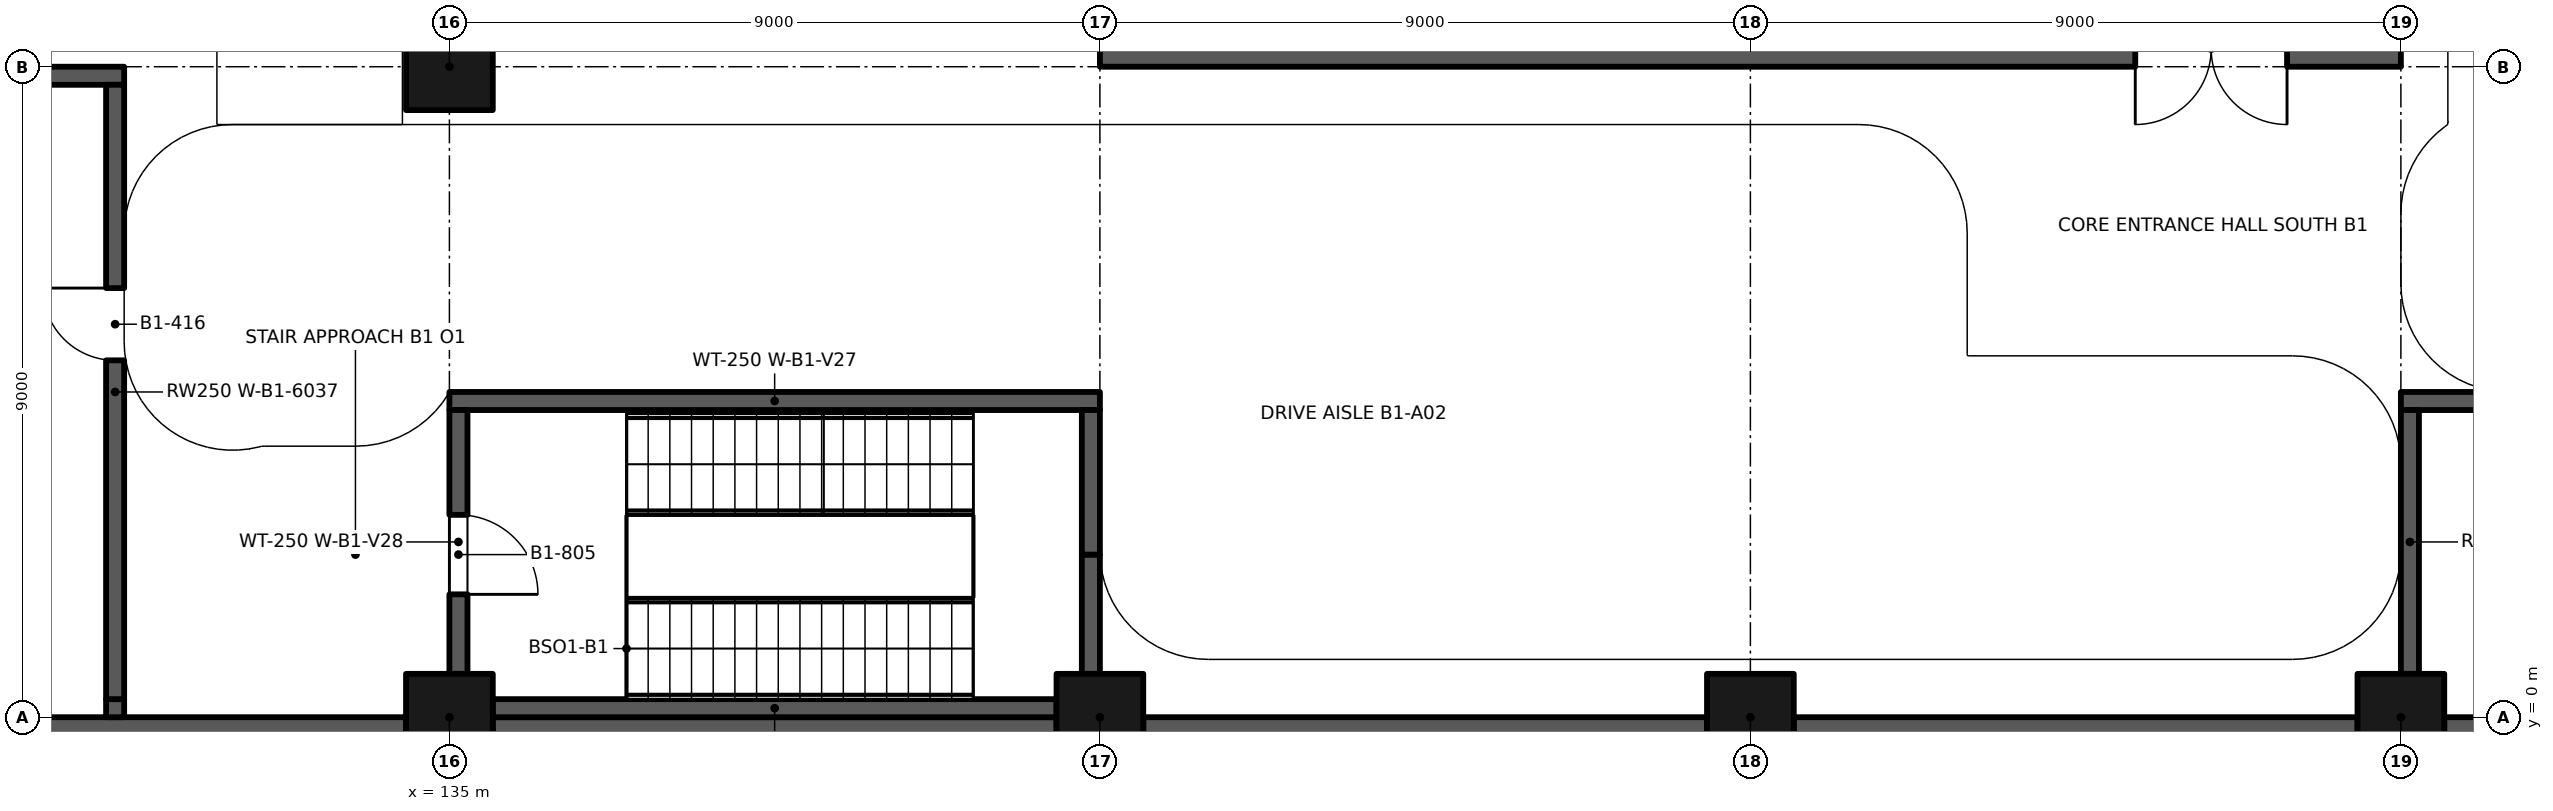
"""IFC4 building model, lengths in metres.
Left out: names, types, materials, properties, quantities, classifications, styles, units other than length and angle.
Written with IfcOpenShell. Run it as: python <this file> out.ifc"""

import sys

from ifc_helpers import new_model, si_unit, direction, frame, frame_2d, origin, origin_2d, place, context, subcontext, project, spatial, rectangle, extrude, element, fill, save


model = new_model("IFC4")
c1 = context("Model", 3, precision=1e-05, world=origin(), true_north=direction((0.0, 1.0)))
c2 = subcontext(c1, "Body", "Model", "MODEL_VIEW")
j1 = project(units=[si_unit("LENGTHUNIT", "METRE"), si_unit("PLANEANGLEUNIT", "RADIAN")], contexts=[c1])
p1 = place(None, origin())
s1 = spatial("IfcSite", under=j1, at=p1, CompositionType="ELEMENT")
p2 = place(p1, origin())
s2 = spatial("IfcBuilding", under=s1, at=p2, CompositionType="ELEMENT")
p3 = place(p2, frame((0.0, 0.0, -5.1)))
s3 = spatial("IfcBuildingStorey", under=s2, at=p3, CompositionType="ELEMENT", Elevation=-5.1)
for number, where, z_axis, x_axis in (
    (1, (126.6, -0.2, 0.0), (0.0, 0.0, 1.0), (1.0, 0.0, 0.0)),
    (2, (135.6, -0.2, 0.0), (0.0, 0.0, 1.0), (1.0, 0.0, 0.0)),
    (3, (144.6, -0.2, 0.0), (0.0, 0.0, 1.0), (1.0, 0.0, 0.0)),
    (4, (153.6, -0.2, 0.0), (0.0, 0.0, 1.0), (1.0, 0.0, 0.0)),
    (5, (162.6, -0.2, 0.0), (0.0, 0.0, 1.0), (1.0, 0.0, 0.0)),
):
    element("IfcWall", number, at=place(p3, frame(where, z_axis=z_axis, x_axis=x_axis)), inside=s3, PredefinedType="SOLIDWALL", context=c2, shape_type="SweptSolid", body=[
        extrude(rectangle(XDim=7.8, YDim=0.4, at=frame_2d((3.9, 0.0))), origin(), (0.0, 0.0, 1.0), 5.1),
    ])
for number, where, z_axis, x_axis in (
    (6, (135.0, 0.0, 0.0), (0.0, 0.0, 1.0), (1.0, 0.0, 0.0)),
    (7, (144.0, 0.0, 0.0), (0.0, 0.0, 1.0), (1.0, 0.0, 0.0)),
    (8, (153.0, 0.0, 0.0), (0.0, 0.0, 1.0), (1.0, 0.0, 0.0)),
    (9, (162.0, 0.0, 0.0), (0.0, 0.0, 1.0), (1.0, 0.0, 0.0)),
    (10, (135.0, 9.0, 0.0), (0.0, 0.0, 1.0), (1.0, 0.0, 0.0)),
):
    element("IfcColumn", number, at=place(p3, frame(where, z_axis=z_axis, x_axis=x_axis)), inside=s3, PredefinedType="COLUMN", context=c2, shape_type="SweptSolid", body=[
        extrude(rectangle(XDim=1.2, YDim=1.2, at=origin_2d()), origin(), (0.0, 0.0, 1.0), 5.1),
    ])
p4 = place(p3, frame((135.6, 0.125, 0.0), z_axis=(0.0, 0.0, 1.0), x_axis=(1.0, 0.0, 0.0)))
e11 = element("IfcWall", 11, at=p4, inside=s3, PredefinedType="SHEAR", context=c2, shape_type="SweptSolid", body=[
    extrude(rectangle(XDim=7.8, YDim=0.25, at=frame_2d((3.9, 0.0))), origin(), (0.0, 0.0, 1.0), 5.1),
])
p5 = place(p3, frame((135.0, 4.375, 0.0), z_axis=(0.0, 0.0, 1.0), x_axis=(1.0, 0.0, 0.0)))
e12 = element("IfcWall", 12, at=p5, inside=s3, PredefinedType="SHEAR", context=c2, shape_type="SweptSolid", body=[
    extrude(rectangle(XDim=9.0, YDim=0.25, at=frame_2d((4.5, 0.0))), origin(), (0.0, 0.0, 1.0), 5.1),
])
p6 = place(p3, frame((135.125, 0.6, 0.0), z_axis=(0.0, 0.0, 1.0), x_axis=(0.0, 1.0, 0.0)))
e13 = element("IfcWall", 13, at=p6, inside=s3, PredefinedType="SHEAR", context=c2, shape_type="SweptSolid", body=[
    extrude(rectangle(XDim=3.65, YDim=0.25, at=frame_2d((1.825, 0.0))), origin(), (0.0, 0.0, 1.0), 5.1),
])
p7 = place(p6, frame((2.2, 0.0, 0.0), z_axis=(0.0, 0.0, 1.0), x_axis=(-1.0, 0.0, 0.0)))
e14 = element("IfcOpeningElement", 14, at=p7, cuts=e13, PredefinedType="OPENING", context=c2, shape_type="SweptSolid", body=[
    extrude(rectangle(XDim=1.1, YDim=2.1, at=frame_2d((0.55, 1.05))), frame((0.0, 0.135, 0.0), z_axis=(0.0, -1.0, 0.0), x_axis=(1.0, 0.0, 0.0)), (0.0, 0.0, 1.0), 0.27),
])
p8 = place(p3, frame((143.875, 0.6, 0.0), z_axis=(0.0, 0.0, 1.0), x_axis=(0.0, 1.0, 0.0)))
e15 = element("IfcWall", 15, at=p8, inside=s3, PredefinedType="SHEAR", context=c2, shape_type="SweptSolid", body=[
    extrude(rectangle(XDim=1.65, YDim=0.25, at=frame_2d((0.825, 0.0))), origin(), (0.0, 0.0, 1.0), 5.1),
])
p9 = place(p3, frame((143.875, 2.25, 0.0), z_axis=(0.0, 0.0, 1.0), x_axis=(0.0, 1.0, 0.0)))
e16 = element("IfcWall", 16, at=p9, inside=s3, PredefinedType="SHEAR", context=c2, shape_type="SweptSolid", body=[
    extrude(rectangle(XDim=2.0, YDim=0.25, at=frame_2d((1.0, 0.0))), origin(), (0.0, 0.0, 1.0), 5.1),
])
p10 = place(p3, frame((162.0, 4.375, 0.0), z_axis=(0.0, 0.0, 1.0), x_axis=(1.0, 0.0, 0.0)))
e17 = element("IfcWall", 17, at=p10, inside=s3, PredefinedType="SOLIDWALL", context=c2, shape_type="SweptSolid", body=[
    extrude(rectangle(XDim=8.75, YDim=0.25, at=frame_2d((4.375, 0.0))), origin(), (0.0, 0.0, 1.0), 4.75),
])
p11 = place(p10, frame((5.062, 0.0, 0.0), z_axis=(0.0, 0.0, 1.0), x_axis=(-1.0, 0.0, 0.0)))
e18 = element("IfcOpeningElement", 18, at=p11, cuts=e17, PredefinedType="OPENING", context=c2, shape_type="SweptSolid", body=[
    extrude(rectangle(XDim=1.0, YDim=2.1, at=frame_2d((0.5, 1.05))), frame((0.0, 0.135, 0.0), z_axis=(0.0, -1.0, 0.0), x_axis=(1.0, 0.0, 0.0)), (0.0, 0.0, 1.0), 0.27),
])
p12 = place(p3, frame((126.6, 8.875, 0.0), z_axis=(0.0, 0.0, 1.0), x_axis=(1.0, 0.0, 0.0)))
e19 = element("IfcWall", 19, at=p12, inside=s3, PredefinedType="SOLIDWALL", context=c2, shape_type="SweptSolid", body=[
    extrude(rectangle(XDim=3.9, YDim=0.25, at=frame_2d((1.95, 0.0))), origin(), (0.0, 0.0, 1.0), 4.75),
])
p13 = place(p3, frame((144.0, 9.25, 0.0), z_axis=(0.0, 0.0, 1.0), x_axis=(1.0, 0.0, 0.0)))
e20 = element("IfcWall", 20, at=p13, inside=s3, PredefinedType="SHEAR", context=c2, shape_type="SweptSolid", body=[
    extrude(rectangle(XDim=18.0, YDim=0.5, at=frame_2d((9.0, 0.0))), origin(), (0.0, 0.0, 1.0), 4.75),
])
p14 = place(p13, frame((16.425, 0.0, 0.0), z_axis=(0.0, 0.0, 1.0), x_axis=(-1.0, 0.0, 0.0)))
e21 = element("IfcOpeningElement", 21, at=p14, cuts=e20, PredefinedType="OPENING", context=c2, shape_type="SweptSolid", body=[
    extrude(rectangle(XDim=2.1, YDim=2.4, at=frame_2d((1.05, 1.2))), frame((0.0, 0.26, 0.0), z_axis=(0.0, -1.0, 0.0), x_axis=(1.0, 0.0, 0.0)), (0.0, 0.0, 1.0), 0.52),
])
p15 = place(p3, frame((130.375, 0.0, 0.0), z_axis=(0.0, 0.0, 1.0), x_axis=(0.0, 1.0, 0.0)))
e22 = element("IfcWall", 22, at=p15, inside=s3, PredefinedType="SOLIDWALL", context=c2, shape_type="SweptSolid", body=[
    extrude(rectangle(XDim=0.25, YDim=0.25, at=frame_2d((0.125, 0.0))), origin(), (0.0, 0.0, 1.0), 4.2),
])
p16 = place(p3, frame((130.375, 0.25, 0.0), z_axis=(0.0, 0.0, 1.0), x_axis=(0.0, 1.0, 0.0)))
e23 = element("IfcWall", 23, at=p16, inside=s3, PredefinedType="SOLIDWALL", context=c2, shape_type="SweptSolid", body=[
    extrude(rectangle(XDim=8.5, YDim=0.25, at=frame_2d((4.25, 0.0))), origin(), (0.0, 0.0, 1.0), 4.75),
])
p17 = place(p16, frame((4.688, 0.0, 0.0)))
e24 = element("IfcOpeningElement", 24, at=p17, cuts=e23, PredefinedType="OPENING", context=c2, shape_type="SweptSolid", body=[
    extrude(rectangle(XDim=1.0, YDim=2.1, at=frame_2d((0.5, 1.05))), frame((0.0, 0.135, 0.0), z_axis=(0.0, -1.0, 0.0), x_axis=(1.0, 0.0, 0.0)), (0.0, 0.0, 1.0), 0.27),
])
p18 = place(p3, frame((162.125, 0.6, 0.0), z_axis=(0.0, 0.0, 1.0), x_axis=(0.0, 1.0, 0.0)))
e25 = element("IfcWall", 25, at=p18, inside=s3, PredefinedType="SOLIDWALL", context=c2, shape_type="SweptSolid", body=[
    extrude(rectangle(XDim=3.65, YDim=0.25, at=frame_2d((1.825, 0.0))), origin(), (0.0, 0.0, 1.0), 4.75),
])
p19 = place(p7, origin())
e26 = element("IfcDoor", 26, at=p19, inside=s3, OperationType="SINGLE_SWING_RIGHT", PredefinedType="DOOR", context=c2, shape_type="SweptSolid", body=[
    extrude(rectangle(XDim=1.1, YDim=2.1, at=frame_2d((0.55, 1.05))), frame((0.0, 0.025, 0.0), z_axis=(0.0, -1.0, 0.0), x_axis=(1.0, 0.0, 0.0)), (0.0, 0.0, 1.0), 0.05),
])
fill(e14, e26)
p20 = place(p17, origin())
e27 = element("IfcDoor", 27, at=p20, inside=s3, OperationType="SINGLE_SWING_RIGHT", PredefinedType="DOOR", context=c2, shape_type="SweptSolid", body=[
    extrude(rectangle(XDim=1.0, YDim=2.1, at=frame_2d((0.5, 1.05))), frame((0.0, 0.025, 0.0), z_axis=(0.0, -1.0, 0.0), x_axis=(1.0, 0.0, 0.0)), (0.0, 0.0, 1.0), 0.05),
])
fill(e24, e27)
save(model, sys.argv[1])
